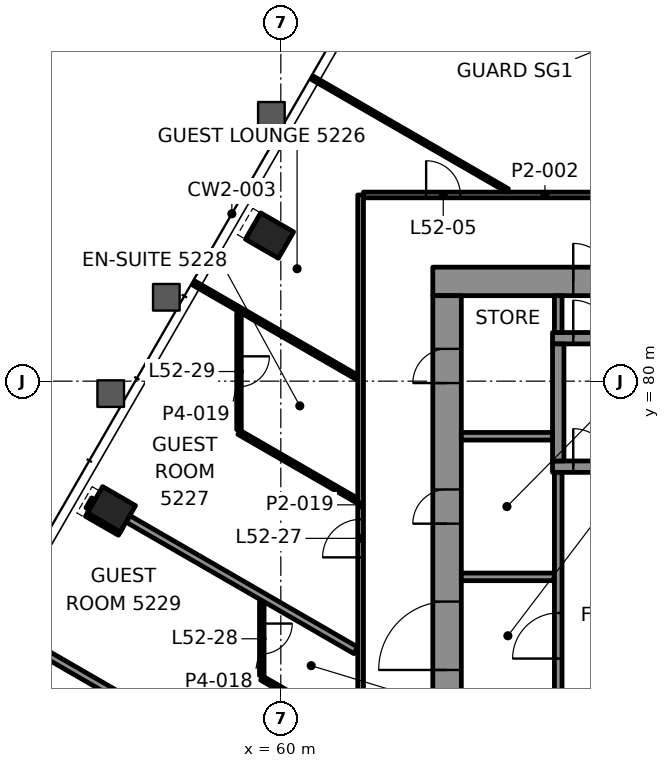
"""IFC4 building model, lengths in metres.
Left out: names, types, materials, properties, quantities, classifications, styles, units other than length and angle.
Written with IfcOpenShell. Run it as: python <this file> out.ifc"""

import sys

from ifc_helpers import new_model, si_unit, direction, frame, frame_2d, origin, origin_2d, place, context, subcontext, project, spatial, rectangle, hollow_rectangle, extrude, element, fill, save


model = new_model("IFC4")
c1 = context("Model", 3, precision=1e-05, world=origin(), true_north=direction((0.0, 1.0)))
c2 = subcontext(c1, "Body", "Model", "MODEL_VIEW")
j1 = project(units=[si_unit("LENGTHUNIT", "METRE"), si_unit("PLANEANGLEUNIT", "RADIAN")], contexts=[c1])
p1 = place(None, origin())
s1 = spatial("IfcSite", under=j1, at=p1, CompositionType="ELEMENT")
p2 = place(p1, origin())
s2 = spatial("IfcBuilding", under=s1, at=p2, CompositionType="ELEMENT")
p3 = place(p2, frame((0.0, 0.0, 222.1)))
s3 = spatial("IfcBuildingStorey", under=s2, at=p3, CompositionType="ELEMENT", Elevation=222.1)
for number, where, z_axis, x_axis in (
    (1, (59.703, 83.832, -0.0), (0.0, 0.0, 1.0), (-0.5, -0.866, 0.0)),
    (2, (55.544, 76.628, -0.0), (0.0, 0.0, 1.0), (-0.5, -0.866, 0.0)),
):
    element("IfcColumn", number, at=place(p3, frame(where, z_axis=z_axis, x_axis=x_axis)), inside=s3, PredefinedType="COLUMN", context=c2, shape_type="SweptSolid", body=[
        extrude(hollow_rectangle(XDim=0.8, YDim=1.0, WallThickness=0.05, at=origin_2d()), origin(), (0.0, 0.0, 1.0), 3.9),
    ])
p4 = place(p3, frame((64.0, 82.625, 0.0), z_axis=(0.0, 0.0, 1.0), x_axis=(1.0, 0.0, 0.0)))
e3 = element("IfcWall", 3, at=p4, inside=s3, PredefinedType="SHEAR", context=c2, shape_type="SweptSolid", body=[
    extrude(rectangle(XDim=22.0, YDim=0.75, at=frame_2d((11.0, 0.0))), origin(), (0.0, 0.0, 1.0), 3.7),
])
p5 = place(p4, frame((3.695, 0.0, 0.0)))
e4 = element("IfcOpeningElement", 4, at=p5, cuts=e3, PredefinedType="OPENING", context=c2, shape_type="SweptSolid", body=[
    extrude(rectangle(XDim=1.0, YDim=2.1, at=frame_2d((0.5, 1.05))), frame((0.0, 0.385, 0.0), z_axis=(0.0, -1.0, 0.0), x_axis=(1.0, 0.0, 0.0)), (0.0, 0.0, 1.0), 0.77),
])
p6 = place(p4, frame((17.505, 0.0, 0.0)))
e5 = element("IfcOpeningElement", 5, at=p6, cuts=e3, PredefinedType="OPENING", context=c2, shape_type="SweptSolid", body=[
    extrude(rectangle(XDim=1.0, YDim=2.1, at=frame_2d((0.5, 1.05))), frame((0.0, 0.385, 0.0), z_axis=(0.0, -1.0, 0.0), x_axis=(1.0, 0.0, 0.0)), (0.0, 0.0, 1.0), 0.77),
])
p7 = place(p4, frame((10.65, 0.0, 0.0)))
e6 = element("IfcOpeningElement", 6, at=p7, cuts=e3, PredefinedType="OPENING", context=c2, shape_type="SweptSolid", body=[
    extrude(rectangle(XDim=0.9, YDim=2.1, at=frame_2d((0.45, 1.05))), frame((0.0, 0.385, 0.0), z_axis=(0.0, -1.0, 0.0), x_axis=(1.0, 0.0, 0.0)), (0.0, 0.0, 1.0), 0.77),
])
p8 = place(p3, frame((64.375, 67.75, 0.0), z_axis=(0.0, 0.0, 1.0), x_axis=(0.0, 1.0, 0.0)))
e7 = element("IfcWall", 7, at=p8, inside=s3, PredefinedType="SHEAR", context=c2, shape_type="SweptSolid", body=[
    extrude(rectangle(XDim=14.5, YDim=0.75, at=frame_2d((7.25, 0.0))), origin(), (0.0, 0.0, 1.0), 3.7),
])
p9 = place(p8, frame((4.65, 0.0, 0.0)))
e8 = element("IfcOpeningElement", 8, at=p9, cuts=e7, PredefinedType="OPENING", context=c2, shape_type="SweptSolid", body=[
    extrude(rectangle(XDim=1.8, YDim=2.1, at=frame_2d((0.9, 1.05))), frame((0.0, 0.385, 0.0), z_axis=(0.0, -1.0, 0.0), x_axis=(1.0, 0.0, 0.0)), (0.0, 0.0, 1.0), 0.77),
])
p10 = place(p8, frame((8.5, 0.0, 0.0)))
e9 = element("IfcOpeningElement", 9, at=p10, cuts=e7, PredefinedType="OPENING", context=c2, shape_type="SweptSolid", body=[
    extrude(rectangle(XDim=0.9, YDim=2.1, at=frame_2d((0.45, 1.05))), frame((0.0, 0.385, 0.0), z_axis=(0.0, -1.0, 0.0), x_axis=(1.0, 0.0, 0.0)), (0.0, 0.0, 1.0), 0.77),
])
p11 = place(p8, frame((12.2, 0.0, 0.0)))
e10 = element("IfcOpeningElement", 10, at=p11, cuts=e7, PredefinedType="OPENING", context=c2, shape_type="SweptSolid", body=[
    extrude(rectangle(XDim=0.9, YDim=2.1, at=frame_2d((0.45, 1.05))), frame((0.0, 0.385, 0.0), z_axis=(0.0, -1.0, 0.0), x_axis=(1.0, 0.0, 0.0)), (0.0, 0.0, 1.0), 0.77),
])
p12 = place(p3, frame((67.15, 77.75, 0.0), z_axis=(0.0, 0.0, 1.0), x_axis=(1.0, 0.0, 0.0)))
e11 = element("IfcWall", 11, at=p12, inside=s3, PredefinedType="SHEAR", context=c2, shape_type="SweptSolid", body=[
    extrude(rectangle(XDim=17.45, YDim=0.3, at=frame_2d((8.725, 0.0))), origin(), (0.0, 0.0, 1.0), 3.7),
])
p13 = place(p12, frame((0.545, 0.0, 0.0)))
e12 = element("IfcOpeningElement", 12, at=p13, cuts=e11, PredefinedType="OPENING", context=c2, shape_type="SweptSolid", body=[
    extrude(rectangle(XDim=1.0, YDim=2.1, at=frame_2d((0.5, 1.05))), frame((0.0, 0.16, 0.0), z_axis=(0.0, -1.0, 0.0), x_axis=(1.0, 0.0, 0.0)), (0.0, 0.0, 1.0), 0.32),
])
p14 = place(p3, frame((67.15, 81.13, 0.0), z_axis=(0.0, 0.0, 1.0), x_axis=(1.0, 0.0, 0.0)))
e13 = element("IfcWall", 13, at=p14, inside=s3, PredefinedType="SHEAR", context=c2, shape_type="SweptSolid", body=[
    extrude(rectangle(XDim=6.91, YDim=0.3, at=frame_2d((3.455, 0.0))), origin(), (0.0, 0.0, 1.0), 3.7),
])
p15 = place(p14, frame((0.545, 0.0, 0.0)))
e14 = element("IfcOpeningElement", 14, at=p15, cuts=e13, PredefinedType="OPENING", context=c2, shape_type="SweptSolid", body=[
    extrude(rectangle(XDim=1.0, YDim=2.1, at=frame_2d((0.5, 1.05))), frame((0.0, 0.16, 0.0), z_axis=(0.0, -1.0, 0.0), x_axis=(1.0, 0.0, 0.0)), (0.0, 0.0, 1.0), 0.32),
])
p16 = place(p3, frame((67.3, 77.9, 0.0), z_axis=(0.0, 0.0, 1.0), x_axis=(0.0, 1.0, 0.0)))
e15 = element("IfcWall", 15, at=p16, inside=s3, PredefinedType="SHEAR", context=c2, shape_type="SweptSolid", body=[
    extrude(rectangle(XDim=3.08, YDim=0.3, at=frame_2d((1.54, 0.0))), origin(), (0.0, 0.0, 1.0), 3.7),
])
p17 = place(p3, frame((62.176, 84.9, 0.0), z_axis=(0.0, 0.0, 1.0), x_axis=(1.0, 0.0, 0.0)))
e16 = element("IfcWall", 16, at=p17, inside=s3, PredefinedType="PARTITIONING", context=c2, shape_type="SweptSolid", body=[
    extrude(rectangle(XDim=9.55, YDim=0.15, at=frame_2d((4.775, 0.0))), origin(), (0.0, 0.0, 1.0), 3.097),
])
p18 = place(p17, frame((1.649, 0.0, 0.0)))
e17 = element("IfcOpeningElement", 17, at=p18, cuts=e16, PredefinedType="OPENING", context=c2, shape_type="SweptSolid", body=[
    extrude(rectangle(XDim=0.9, YDim=2.1, at=frame_2d((0.45, 1.05))), frame((0.0, 0.085, 0.0), z_axis=(0.0, -1.0, 0.0), x_axis=(1.0, 0.0, 0.0)), (0.0, 0.0, 1.0), 0.17),
])
p19 = place(p17, frame((7.759, 0.0, 0.0)))
e18 = element("IfcOpeningElement", 18, at=p19, cuts=e16, PredefinedType="OPENING", context=c2, shape_type="SweptSolid", body=[
    extrude(rectangle(XDim=1.0, YDim=2.1, at=frame_2d((0.5, 1.05))), frame((0.0, 0.085, 0.0), z_axis=(0.0, -1.0, 0.0), x_axis=(1.0, 0.0, 0.0)), (0.0, 0.0, 1.0), 0.17),
])
p20 = place(p3, frame((54.961, 76.619, 0.0), z_axis=(0.0, 0.0, 1.0), x_axis=(0.500426713919, 0.865778900179, 0.0)))
e19 = element("IfcWall", 19, at=p20, inside=s3, PredefinedType="PARTITIONING", context=c2, shape_type="SweptSolid", body=[
    extrude(rectangle(XDim=0.3, YDim=0.2, at=frame_2d((0.15, 0.0))), origin(), (0.0, 0.0, 1.0), 3.1),
])
p21 = place(p3, frame((62.1, 68.591, 0.0), z_axis=(0.0, 0.0, 1.0), x_axis=(0.0, 1.0, 0.0)))
e20 = element("IfcWall", 20, at=p21, inside=s3, PredefinedType="PARTITIONING", context=c2, shape_type="SweptSolid", body=[
    extrude(rectangle(XDim=16.308, YDim=0.15, at=frame_2d((8.154, 0.0))), origin(), (0.0, 0.0, 1.0), 3.1),
])
p22 = place(p21, frame((0.96, 0.0, 0.0)))
e21 = element("IfcOpeningElement", 21, at=p22, cuts=e20, PredefinedType="OPENING", context=c2, shape_type="SweptSolid", body=[
    extrude(rectangle(XDim=1.0, YDim=2.1, at=frame_2d((0.5, 1.05))), frame((0.0, 0.085, 0.0), z_axis=(0.0, -1.0, 0.0), x_axis=(1.0, 0.0, 0.0)), (0.0, 0.0, 1.0), 0.17),
])
p23 = place(p21, frame((6.772, 0.0, 0.0)))
e22 = element("IfcOpeningElement", 22, at=p23, cuts=e20, PredefinedType="OPENING", context=c2, shape_type="SweptSolid", body=[
    extrude(rectangle(XDim=1.0, YDim=2.1, at=frame_2d((0.5, 1.05))), frame((0.0, 0.085, 0.0), z_axis=(0.0, -1.0, 0.0), x_axis=(1.0, 0.0, 0.0)), (0.0, 0.0, 1.0), 0.17),
])
p24 = place(p3, frame((59.5, 74.189, 0.0), z_axis=(0.0, 0.0, 1.0), x_axis=(0.0, -1.0, 0.0)))
e23 = element("IfcWall", 23, at=p24, inside=s3, PredefinedType="PARTITIONING", context=c2, shape_type="SweptSolid", body=[
    extrude(rectangle(XDim=1.936, YDim=0.12, at=frame_2d((0.968, 0.0))), origin(), (0.0, 0.0, 1.0), 3.1),
])
p25 = place(p24, frame((0.568, 0.0, 0.0)))
e24 = element("IfcOpeningElement", 24, at=p25, cuts=e23, PredefinedType="OPENING", context=c2, shape_type="SweptSolid", body=[
    extrude(rectangle(XDim=0.8, YDim=2.1, at=frame_2d((0.4, 1.05))), frame((0.0, 0.07, 0.0), z_axis=(0.0, -1.0, 0.0), x_axis=(1.0, 0.0, 0.0)), (0.0, 0.0, 1.0), 0.14),
])
p26 = place(p3, frame((58.9, 81.785, 0.0), z_axis=(0.0, 0.0, 1.0), x_axis=(0.0, -1.0, 0.0)))
e25 = element("IfcWall", 25, at=p26, inside=s3, PredefinedType="PARTITIONING", context=c2, shape_type="SweptSolid", body=[
    extrude(rectangle(XDim=3.063, YDim=0.12, at=frame_2d((1.531, 0.0))), origin(), (0.0, 0.0, 1.0), 3.1),
])
p27 = place(p26, frame((1.131, 0.0, 0.0)))
e26 = element("IfcOpeningElement", 26, at=p27, cuts=e25, PredefinedType="OPENING", context=c2, shape_type="SweptSolid", body=[
    extrude(rectangle(XDim=0.8, YDim=2.1, at=frame_2d((0.4, 1.05))), frame((0.0, 0.07, 0.0), z_axis=(0.0, -1.0, 0.0), x_axis=(1.0, 0.0, 0.0)), (0.0, 0.0, 1.0), 0.14),
])
p28 = place(p3, frame((69.79, 88.092, 0.0), z_axis=(0.0, 0.0, 1.0), x_axis=(-0.866045006744, 0.49996604514, 0.0)))
e27 = element("IfcWall", 27, at=p28, inside=s3, PredefinedType="PARTITIONING", context=c2, shape_type="SweptSolid", body=[
    extrude(rectangle(XDim=3.499, YDim=0.12, at=frame_2d((1.75, 0.0))), origin(), (0.0, 0.0, 1.0), 3.1),
])
p29 = place(p3, frame((65.963, 85.02, 0.0), z_axis=(0.0, 0.0, 1.0), x_axis=(-0.866029186229, 0.499993448556, 0.0)))
e28 = element("IfcWall", 28, at=p29, inside=s3, PredefinedType="PARTITIONING", context=c2, shape_type="SweptSolid", body=[
    extrude(rectangle(XDim=5.927, YDim=0.1, at=frame_2d((2.963, 0.0))), origin(), (0.0, 0.0, 1.0), 3.022),
])
p30 = place(p3, frame((61.991, 80.11, 0.0), z_axis=(0.0, 0.0, 1.0), x_axis=(-0.866024338871, 0.500001844479, 0.0)))
e29 = element("IfcWall", 29, at=p30, inside=s3, PredefinedType="PARTITIONING", context=c2, shape_type="SweptSolid", body=[
    extrude(rectangle(XDim=4.942, YDim=0.12, at=frame_2d((2.471, 0.0))), origin(), (0.0, 0.0, 1.0), 3.022),
])
p31 = place(p3, frame((61.99, 76.868, 0.0), z_axis=(0.0, 0.0, 1.0), x_axis=(-0.866028357664, 0.499994883695, 0.0)))
e30 = element("IfcWall", 30, at=p31, inside=s3, PredefinedType="PARTITIONING", context=c2, shape_type="SweptSolid", body=[
    extrude(rectangle(XDim=3.568, YDim=0.12, at=frame_2d((1.784, 0.0))), origin(), (0.0, 0.0, 1.0), 3.1),
])
p32 = place(p3, frame((61.973, 72.917, 0.0), z_axis=(0.0, 0.0, 1.0), x_axis=(-0.866027621823, 0.499996158224, 0.0)))
e31 = element("IfcWall", 31, at=p32, inside=s3, PredefinedType="PARTITIONING", context=c2, shape_type="SweptSolid", body=[
    extrude(rectangle(XDim=6.923, YDim=0.2, at=frame_2d((3.462, 0.0))), origin(), (0.0, 0.0, 1.0), 3.1),
])
p33 = place(p3, frame((55.777, 76.032, 0.0), z_axis=(0.0, 0.0, 1.0), x_axis=(-0.866010750942, 0.50002537861, 0.0)))
e32 = element("IfcWall", 32, at=p33, inside=s3, PredefinedType="PARTITIONING", context=c2, shape_type="SweptSolid", body=[
    extrude(rectangle(XDim=1.0, YDim=0.2, at=frame_2d((0.5, 0.0))), origin(), (0.0, 0.0, 1.0), 3.022),
])
p34 = place(p3, frame((61.99, 70.746, 0.0), z_axis=(0.0, 0.0, 1.0), x_axis=(-0.86600886466, 0.50002864551, 0.0)))
e33 = element("IfcWall", 33, at=p34, inside=s3, PredefinedType="PARTITIONING", context=c2, shape_type="SweptSolid", body=[
    extrude(rectangle(XDim=2.876, YDim=0.12, at=frame_2d((1.438, 0.0))), origin(), (0.0, 0.0, 1.0), 3.1),
])
p35 = place(p3, frame((61.497, 68.39, 0.0), z_axis=(0.0, 0.0, 1.0), x_axis=(-0.866030396021, 0.499991353094, 0.0)))
e34 = element("IfcWall", 34, at=p35, inside=s3, PredefinedType="PARTITIONING", context=c2, shape_type="SweptSolid", body=[
    extrude(rectangle(XDim=10.374, YDim=0.2, at=frame_2d((5.187, 0.0))), origin(), (0.0, 0.0, 1.0), 3.022),
])
p36 = place(p3, frame((64.75, 74.85, 0.0), z_axis=(0.0, 0.0, 1.0), x_axis=(1.0, 0.0, 0.0)))
e35 = element("IfcWall", 35, at=p36, inside=s3, PredefinedType="PARTITIONING", context=c2, shape_type="SweptSolid", body=[
    extrude(rectangle(XDim=2.45, YDim=0.2, at=frame_2d((1.225, 0.0))), origin(), (0.0, 0.0, 1.0), 3.7),
])
p37 = place(p3, frame((64.75, 78.55, 0.0), z_axis=(0.0, 0.0, 1.0), x_axis=(1.0, 0.0, 0.0)))
e36 = element("IfcWall", 36, at=p37, inside=s3, PredefinedType="PARTITIONING", context=c2, shape_type="SweptSolid", body=[
    extrude(rectangle(XDim=2.4, YDim=0.2, at=frame_2d((1.2, 0.0))), origin(), (0.0, 0.0, 1.0), 3.7),
])
p38 = place(p3, frame((67.3, 71.85, 0.0), z_axis=(0.0, 0.0, 1.0), x_axis=(0.0, 1.0, 0.0)))
e37 = element("IfcWall", 37, at=p38, inside=s3, PredefinedType="PARTITIONING", context=c2, shape_type="SweptSolid", body=[
    extrude(rectangle(XDim=5.75, YDim=0.2, at=frame_2d((2.875, 0.0))), origin(), (0.0, 0.0, 1.0), 3.7),
])
p39 = place(p38, frame((0.85, 0.0, 0.0)))
e38 = element("IfcOpeningElement", 38, at=p39, cuts=e37, PredefinedType="OPENING", context=c2, shape_type="SweptSolid", body=[
    extrude(rectangle(XDim=1.2, YDim=2.1, at=frame_2d((0.6, 1.05))), frame((0.0, 0.11, 0.0), z_axis=(0.0, -1.0, 0.0), x_axis=(1.0, 0.0, 0.0)), (0.0, 0.0, 1.0), 0.22),
])
p40 = place(p3, frame((67.3, 81.28, 0.0), z_axis=(0.0, 0.0, 1.0), x_axis=(0.0, 1.0, 0.0)))
e39 = element("IfcWall", 39, at=p40, inside=s3, PredefinedType="PARTITIONING", context=c2, shape_type="SweptSolid", body=[
    extrude(rectangle(XDim=0.97, YDim=0.2, at=frame_2d((0.485, 0.0))), origin(), (0.0, 0.0, 1.0), 3.7),
])
p41 = place(p18, origin())
e40 = element("IfcDoor", 40, at=p41, inside=s3, OperationType="SINGLE_SWING_LEFT", PredefinedType="DOOR", context=c2, shape_type="SweptSolid", body=[
    extrude(rectangle(XDim=0.9, YDim=2.1, at=frame_2d((0.45, 1.05))), frame((0.0, 0.025, 0.0), z_axis=(0.0, -1.0, 0.0), x_axis=(1.0, 0.0, 0.0)), (0.0, 0.0, 1.0), 0.05),
])
fill(e17, e40)
p42 = place(p23, origin())
e41 = element("IfcDoor", 41, at=p42, inside=s3, OperationType="SINGLE_SWING_RIGHT", PredefinedType="DOOR", context=c2, shape_type="SweptSolid", body=[
    extrude(rectangle(XDim=1.0, YDim=2.1, at=frame_2d((0.5, 1.05))), frame((0.0, 0.025, 0.0), z_axis=(0.0, -1.0, 0.0), x_axis=(1.0, 0.0, 0.0)), (0.0, 0.0, 1.0), 0.05),
])
fill(e22, e41)
p43 = place(p25, origin())
e42 = element("IfcDoor", 42, at=p43, inside=s3, OperationType="SINGLE_SWING_RIGHT", PredefinedType="DOOR", context=c2, shape_type="SweptSolid", body=[
    extrude(rectangle(XDim=0.8, YDim=2.1, at=frame_2d((0.4, 1.05))), frame((0.0, 0.025, 0.0), z_axis=(0.0, -1.0, 0.0), x_axis=(1.0, 0.0, 0.0)), (0.0, 0.0, 1.0), 0.05),
])
fill(e24, e42)
p44 = place(p27, origin())
e43 = element("IfcDoor", 43, at=p44, inside=s3, OperationType="SINGLE_SWING_RIGHT", PredefinedType="DOOR", context=c2, shape_type="SweptSolid", body=[
    extrude(rectangle(XDim=0.8, YDim=2.1, at=frame_2d((0.4, 1.05))), frame((0.0, 0.025, 0.0), z_axis=(0.0, -1.0, 0.0), x_axis=(1.0, 0.0, 0.0)), (0.0, 0.0, 1.0), 0.05),
])
fill(e26, e43)
p45 = place(p13, origin())
e44 = element("IfcDoor", 44, at=p45, inside=s3, OperationType="SINGLE_SWING_LEFT", PredefinedType="DOOR", context=c2, shape_type="SweptSolid", body=[
    extrude(rectangle(XDim=1.0, YDim=2.1, at=frame_2d((0.5, 1.05))), frame((0.0, 0.025, 0.0), z_axis=(0.0, -1.0, 0.0), x_axis=(1.0, 0.0, 0.0)), (0.0, 0.0, 1.0), 0.05),
])
fill(e12, e44)
p46 = place(p15, origin())
e45 = element("IfcDoor", 45, at=p46, inside=s3, OperationType="SINGLE_SWING_RIGHT", PredefinedType="DOOR", context=c2, shape_type="SweptSolid", body=[
    extrude(rectangle(XDim=1.0, YDim=2.1, at=frame_2d((0.5, 1.05))), frame((0.0, 0.025, 0.0), z_axis=(0.0, -1.0, 0.0), x_axis=(1.0, 0.0, 0.0)), (0.0, 0.0, 1.0), 0.05),
])
fill(e14, e45)
p47 = place(p5, origin())
e46 = element("IfcDoor", 46, at=p47, inside=s3, OperationType="SINGLE_SWING_LEFT", PredefinedType="DOOR", context=c2, shape_type="SweptSolid", body=[
    extrude(rectangle(XDim=1.0, YDim=2.1, at=frame_2d((0.5, 1.05))), frame((0.0, 0.095, 0.0), z_axis=(0.0, -1.0, 0.0), x_axis=(1.0, 0.0, 0.0)), (0.0, 0.0, 1.0), 0.19),
])
fill(e4, e46)
p48 = place(p39, origin())
e47 = element("IfcDoor", 47, at=p48, inside=s3, OperationType="SINGLE_SWING_RIGHT", PredefinedType="DOOR", context=c2, shape_type="SweptSolid", body=[
    extrude(rectangle(XDim=1.2, YDim=2.1, at=frame_2d((0.6, 1.05))), frame((0.0, 0.025, 0.0), z_axis=(0.0, -1.0, 0.0), x_axis=(1.0, 0.0, 0.0)), (0.0, 0.0, 1.0), 0.05),
])
fill(e38, e47)
p49 = place(p9, origin())
e48 = element("IfcDoor", 48, at=p49, inside=s3, OperationType="SINGLE_SWING_LEFT", PredefinedType="DOOR", context=c2, shape_type="SweptSolid", body=[
    extrude(rectangle(XDim=1.8, YDim=2.1, at=frame_2d((0.9, 1.05))), frame((0.0, 0.095, 0.0), z_axis=(0.0, -1.0, 0.0), x_axis=(1.0, 0.0, 0.0)), (0.0, 0.0, 1.0), 0.19),
])
fill(e8, e48)
p50 = place(p10, origin())
e49 = element("IfcDoor", 49, at=p50, inside=s3, OperationType="SINGLE_SWING_RIGHT", PredefinedType="DOOR", context=c2, shape_type="SweptSolid", body=[
    extrude(rectangle(XDim=0.9, YDim=2.1, at=frame_2d((0.45, 1.05))), frame((0.0, 0.095, 0.0), z_axis=(0.0, -1.0, 0.0), x_axis=(1.0, 0.0, 0.0)), (0.0, 0.0, 1.0), 0.19),
])
fill(e9, e49)
p51 = place(p11, origin())
e50 = element("IfcDoor", 50, at=p51, inside=s3, OperationType="SINGLE_SWING_LEFT", PredefinedType="DOOR", context=c2, shape_type="SweptSolid", body=[
    extrude(rectangle(XDim=0.9, YDim=2.1, at=frame_2d((0.45, 1.05))), frame((0.0, 0.095, 0.0), z_axis=(0.0, -1.0, 0.0), x_axis=(1.0, 0.0, 0.0)), (0.0, 0.0, 1.0), 0.19),
])
fill(e10, e50)
save(model, sys.argv[1])
